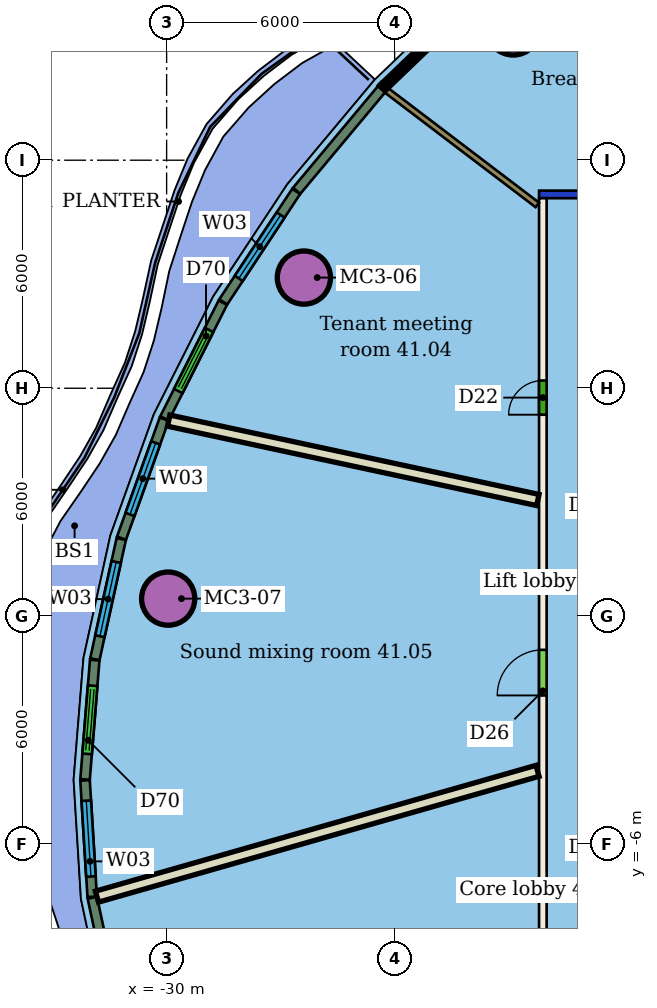
"""IFC4 building model, lengths in metres.
Left out: names, types, materials, properties, quantities, classifications, styles, units other than length and angle.
Written with IfcOpenShell. Run it as: python <this file> out.ifc"""

import sys

from ifc_helpers import new_model, si_unit, direction, frame, frame_2d, origin, origin_2d, place, context, subcontext, project, spatial, rectangle, hollow_circle, extrude, element, fill, save


model = new_model("IFC4")
c1 = context("Model", 3, precision=1e-05, world=origin(), true_north=direction((0.0, 1.0)))
c2 = subcontext(c1, "Body", "Model", "MODEL_VIEW")
j1 = project(units=[si_unit("LENGTHUNIT", "METRE"), si_unit("PLANEANGLEUNIT", "RADIAN")], contexts=[c1])
p1 = place(None, origin())
s1 = spatial("IfcSite", under=j1, at=p1, CompositionType="ELEMENT")
p2 = place(p1, origin())
s2 = spatial("IfcBuilding", under=s1, at=p2, CompositionType="ELEMENT")
p3 = place(p2, frame((0.0, 0.0, 172.2)))
s3 = spatial("IfcBuildingStorey", under=s2, at=p3, CompositionType="ELEMENT", Elevation=172.2)
for number, where, z_axis, x_axis in (
    (1, (-20.879, 15.467, 0.0), (0.0, 0.0, 1.0), (1.0, 0.0, 0.0)),
    (2, (-26.388, 8.912, 0.0), (0.0, 0.0, 1.0), (1.0, 0.0, 0.0)),
    (3, (-29.959, 0.464, 0.0), (0.0, 0.0, 1.0), (1.0, 0.0, 0.0)),
):
    element("IfcColumn", number, at=place(p3, frame(where, z_axis=z_axis, x_axis=x_axis)), inside=s3, PredefinedType="COLUMN", context=c2, shape_type="SweptSolid", body=[
        extrude(hollow_circle(Radius=0.7, WallThickness=0.05, at=origin_2d()), origin(), (0.0, 0.0, 1.0), 3.45),
    ])
p4 = place(p3, frame((-20.1, -11.0, 0.0), z_axis=(0.0, 0.0, 1.0), x_axis=(0.0, 1.0, 0.0)))
e4 = element("IfcWall", 4, at=p4, inside=s3, PredefinedType="PARTITIONING", context=c2, shape_type="SweptSolid", body=[
    extrude(rectangle(XDim=22.0, YDim=0.2, at=frame_2d((11.0, 0.0))), origin(), (0.0, 0.0, 1.0), 3.45),
])
p5 = place(p4, frame((16.303, 0.0, 0.0)))
e5 = element("IfcOpeningElement", 5, at=p5, cuts=e4, PredefinedType="OPENING", context=c2, shape_type="SweptSolid", body=[
    extrude(rectangle(XDim=0.9, YDim=2.1, at=frame_2d((0.45, 1.05))), frame((0.0, 0.11, 0.0), z_axis=(0.0, -1.0, 0.0), x_axis=(1.0, 0.0, 0.0)), (0.0, 0.0, 1.0), 0.22),
])
p6 = place(p4, frame((8.917, 0.0, 0.0)))
e6 = element("IfcOpeningElement", 6, at=p6, cuts=e4, PredefinedType="OPENING", context=c2, shape_type="SweptSolid", body=[
    extrude(rectangle(XDim=1.2, YDim=2.1, at=frame_2d((0.6, 1.05))), frame((0.0, 0.11, 0.0), z_axis=(0.0, -1.0, 0.0), x_axis=(1.0, 0.0, 0.0)), (0.0, 0.0, 1.0), 0.22),
])
p7 = place(p3, frame((-20.2, 11.1, 0.0), z_axis=(0.0, 0.0, 1.0), x_axis=(1.0, 0.0, 0.0)))
e7 = element("IfcWall", 7, at=p7, inside=s3, PredefinedType="PARTITIONING", context=c2, shape_type="SweptSolid", body=[
    extrude(rectangle(XDim=28.4, YDim=0.2, at=frame_2d((14.2, 0.0))), origin(), (0.0, 0.0, 1.0), 3.05),
])
p8 = place(p7, frame((20.272, 0.0, 0.0)))
e8 = element("IfcOpeningElement", 8, at=p8, cuts=e7, PredefinedType="OPENING", context=c2, shape_type="SweptSolid", body=[
    extrude(rectangle(XDim=1.1, YDim=2.1, at=frame_2d((0.55, 1.05))), frame((0.0, 0.11, 0.0), z_axis=(0.0, -1.0, 0.0), x_axis=(1.0, 0.0, 0.0)), (0.0, 0.0, 1.0), 0.22),
])
p9 = place(p7, frame((11.124, 0.0, 0.0)))
e9 = element("IfcOpeningElement", 9, at=p9, cuts=e7, PredefinedType="OPENING", context=c2, shape_type="SweptSolid", body=[
    extrude(rectangle(XDim=1.8, YDim=2.1, at=frame_2d((0.9, 1.05))), frame((0.0, 0.11, 0.0), z_axis=(0.0, -1.0, 0.0), x_axis=(1.0, 0.0, 0.0)), (0.0, 0.0, 1.0), 0.22),
])
p10 = place(p7, frame((5.001, 0.0, 0.0)))
e10 = element("IfcOpeningElement", 10, at=p10, cuts=e7, PredefinedType="OPENING", context=c2, shape_type="SweptSolid", body=[
    extrude(rectangle(XDim=1.5, YDim=2.1, at=frame_2d((0.75, 1.05))), frame((0.0, 0.11, 0.0), z_axis=(0.0, -1.0, 0.0), x_axis=(1.0, 0.0, 0.0)), (0.0, 0.0, 1.0), 0.22),
])
p11 = place(p3, frame((-24.209, 13.835, 0.0), z_axis=(0.0, 0.0, 1.0), x_axis=(0.796229293109, -0.604994969231, 0.0)))
e11 = element("IfcWall", 11, at=p11, inside=s3, PredefinedType="PARTITIONING", context=c2, shape_type="SweptSolid", body=[
    extrude(rectangle(XDim=4.978, YDim=0.15, at=frame_2d((2.489, 0.0))), origin(), (0.0, 0.0, 1.0), 3.45),
])
p12 = place(p3, frame((-29.946, 5.147, 0.0), z_axis=(0.0, 0.0, 1.0), x_axis=(0.977667369108, -0.210158310286, 0.0)))
e12 = element("IfcWall", 12, at=p12, inside=s3, PredefinedType="PARTITIONING", context=c2, shape_type="SweptSolid", body=[
    extrude(rectangle(XDim=9.936, YDim=0.3, at=frame_2d((4.968, 0.0))), origin(), (0.0, 0.0, 1.0), 3.45),
])
p13 = place(p3, frame((-31.834, -7.378, 0.0), z_axis=(0.0, 0.0, 1.0), x_axis=(0.961553744582, 0.274616817183, 0.0)))
e13 = element("IfcWall", 13, at=p13, inside=s3, PredefinedType="PARTITIONING", context=c2, shape_type="SweptSolid", body=[
    extrude(rectangle(XDim=12.056, YDim=0.3, at=frame_2d((6.028, 0.0))), origin(), (0.0, 0.0, 1.0), 3.45),
])
p14 = place(p3, frame((-24.335, 13.878, 0.0), z_axis=(0.0, 0.0, 1.0), x_axis=(-0.64142670303, -0.767184322468, 0.0)))
e14 = element("IfcWall", 14, at=p14, inside=s3, PredefinedType="SOLIDWALL", context=c2, shape_type="SweptSolid", body=[
    extrude(rectangle(XDim=3.496, YDim=0.25, at=frame_2d((1.748, 0.0))), origin(), (0.0, 0.0, 1.0), 3.1),
])
p15 = place(p3, frame((-26.591, 11.177, 0.0), z_axis=(0.0, 0.0, 1.0), x_axis=(-0.551021923649, -0.834490766671, 0.0)))
e15 = element("IfcWall", 15, at=p15, inside=s3, PredefinedType="SOLIDWALL", context=c2, shape_type="SweptSolid", body=[
    extrude(rectangle(XDim=3.482, YDim=0.25, at=frame_2d((1.741, 0.0))), origin(), (0.0, 0.0, 1.0), 3.1),
])
p16 = place(p15, frame((0.741, 0.0, 0.9)))
e16 = element("IfcOpeningElement", 16, at=p16, cuts=e15, PredefinedType="OPENING", context=c2, shape_type="SweptSolid", body=[
    extrude(rectangle(XDim=2.0, YDim=2.1, at=frame_2d((1.0, 1.05))), frame((0.0, 0.135, 0.0), z_axis=(0.0, -1.0, 0.0), x_axis=(1.0, 0.0, 0.0)), (0.0, 0.0, 1.0), 0.27),
])
p17 = place(p3, frame((-28.521, 8.252, 0.0), z_axis=(0.0, 0.0, 1.0), x_axis=(-0.449903975736, -0.893076935441, 0.0)))
e17 = element("IfcWall", 17, at=p17, inside=s3, PredefinedType="SOLIDWALL", context=c2, shape_type="SweptSolid", body=[
    extrude(rectangle(XDim=3.409, YDim=0.25, at=frame_2d((1.705, 0.0))), origin(), (0.0, 0.0, 1.0), 3.1),
])
p18 = place(p17, frame((0.805, 0.0, 0.0)))
e18 = element("IfcOpeningElement", 18, at=p18, cuts=e17, PredefinedType="OPENING", context=c2, shape_type="SweptSolid", body=[
    extrude(rectangle(XDim=1.8, YDim=2.4, at=frame_2d((0.9, 1.2))), frame((0.0, 0.135, 0.0), z_axis=(0.0, -1.0, 0.0), x_axis=(1.0, 0.0, 0.0)), (0.0, 0.0, 1.0), 0.27),
])
p19 = place(p3, frame((-30.064, 5.186, 0.0), z_axis=(0.0, 0.0, 1.0), x_axis=(-0.337661333214, -0.941267668653, 0.0)))
e19 = element("IfcWall", 19, at=p19, inside=s3, PredefinedType="SOLIDWALL", context=c2, shape_type="SweptSolid", body=[
    extrude(rectangle(XDim=3.326, YDim=0.25, at=frame_2d((1.663, 0.0))), origin(), (0.0, 0.0, 1.0), 3.1),
])
p20 = place(p19, frame((0.663, 0.0, 0.9)))
e20 = element("IfcOpeningElement", 20, at=p20, cuts=e19, PredefinedType="OPENING", context=c2, shape_type="SweptSolid", body=[
    extrude(rectangle(XDim=2.0, YDim=2.1, at=frame_2d((1.0, 1.05))), frame((0.0, 0.135, 0.0), z_axis=(0.0, -1.0, 0.0), x_axis=(1.0, 0.0, 0.0)), (0.0, 0.0, 1.0), 0.27),
])
p21 = place(p3, frame((-31.194, 2.032, 0.0), z_axis=(0.0, 0.0, 1.0), x_axis=(-0.21439852093, -0.976746269111, 0.0)))
e21 = element("IfcWall", 21, at=p21, inside=s3, PredefinedType="SOLIDWALL", context=c2, shape_type="SweptSolid", body=[
    extrude(rectangle(XDim=3.237, YDim=0.25, at=frame_2d((1.619, 0.0))), origin(), (0.0, 0.0, 1.0), 3.1),
])
p22 = place(p21, frame((0.619, 0.0, 0.9)))
e22 = element("IfcOpeningElement", 22, at=p22, cuts=e21, PredefinedType="OPENING", context=c2, shape_type="SweptSolid", body=[
    extrude(rectangle(XDim=2.0, YDim=2.1, at=frame_2d((1.0, 1.05))), frame((0.0, 0.135, 0.0), z_axis=(0.0, -1.0, 0.0), x_axis=(1.0, 0.0, 0.0)), (0.0, 0.0, 1.0), 0.27),
])
p23 = place(p3, frame((-31.892, -1.154, 0.0), z_axis=(0.0, 0.0, 1.0), x_axis=(-0.080857499855, -0.996725671746, 0.0)))
e23 = element("IfcWall", 23, at=p23, inside=s3, PredefinedType="SOLIDWALL", context=c2, shape_type="SweptSolid", body=[
    extrude(rectangle(XDim=3.149, YDim=0.25, at=frame_2d((1.575, 0.0))), origin(), (0.0, 0.0, 1.0), 3.1),
])
p24 = place(p23, frame((0.675, 0.0, 0.0)))
e24 = element("IfcOpeningElement", 24, at=p24, cuts=e23, PredefinedType="OPENING", context=c2, shape_type="SweptSolid", body=[
    extrude(rectangle(XDim=1.8, YDim=2.4, at=frame_2d((0.9, 1.2))), frame((0.0, 0.135, 0.0), z_axis=(0.0, -1.0, 0.0), x_axis=(1.0, 0.0, 0.0)), (0.0, 0.0, 1.0), 0.27),
])
p25 = place(p3, frame((-32.147, -4.319, 0.0), z_axis=(0.0, 0.0, 1.0), x_axis=(0.061432025832, -0.99811126945, 0.0)))
e25 = element("IfcWall", 25, at=p25, inside=s3, PredefinedType="SOLIDWALL", context=c2, shape_type="SweptSolid", body=[
    extrude(rectangle(XDim=3.068, YDim=0.25, at=frame_2d((1.534, 0.0))), origin(), (0.0, 0.0, 1.0), 3.1),
])
p26 = place(p25, frame((0.534, 0.0, 0.9)))
e26 = element("IfcOpeningElement", 26, at=p26, cuts=e25, PredefinedType="OPENING", context=c2, shape_type="SweptSolid", body=[
    extrude(rectangle(XDim=2.0, YDim=2.1, at=frame_2d((1.0, 1.05))), frame((0.0, 0.135, 0.0), z_axis=(0.0, -1.0, 0.0), x_axis=(1.0, 0.0, 0.0)), (0.0, 0.0, 1.0), 0.27),
])
p27 = place(p3, frame((-31.955, -7.408, 0.0), z_axis=(0.0, 0.0, 1.0), x_axis=(0.208841558972, -0.977949489108, 0.0)))
e27 = element("IfcWall", 27, at=p27, inside=s3, PredefinedType="SOLIDWALL", context=c2, shape_type="SweptSolid", body=[
    extrude(rectangle(XDim=2.959, YDim=0.25, at=frame_2d((1.479, 0.0))), origin(), (0.0, 0.0, 1.0), 3.1),
])
p28 = place(p5, origin())
e28 = element("IfcDoor", 28, at=p28, inside=s3, OperationType="SINGLE_SWING_LEFT", PredefinedType="DOOR", context=c2, shape_type="SweptSolid", body=[
    extrude(rectangle(XDim=0.9, YDim=2.1, at=frame_2d((0.45, 1.05))), frame((0.0, 0.025, 0.0), z_axis=(0.0, -1.0, 0.0), x_axis=(1.0, 0.0, 0.0)), (0.0, 0.0, 1.0), 0.05),
])
fill(e5, e28)
p29 = place(p6, origin())
e29 = element("IfcDoor", 29, at=p29, inside=s3, OperationType="SINGLE_SWING_LEFT", PredefinedType="DOOR", context=c2, shape_type="SweptSolid", body=[
    extrude(rectangle(XDim=1.2, YDim=2.1, at=frame_2d((0.6, 1.05))), frame((0.0, 0.025, 0.0), z_axis=(0.0, -1.0, 0.0), x_axis=(1.0, 0.0, 0.0)), (0.0, 0.0, 1.0), 0.05),
])
fill(e6, e29)
p30 = place(p16, origin())
e30 = element("IfcWindow", 30, at=p30, inside=s3, PartitioningType="SINGLE_PANEL", PredefinedType="WINDOW", context=c2, shape_type="SweptSolid", body=[
    extrude(rectangle(XDim=2.0, YDim=2.1, at=frame_2d((1.0, 1.05))), frame((0.0, 0.03, 0.0), z_axis=(0.0, -1.0, 0.0), x_axis=(1.0, 0.0, 0.0)), (0.0, 0.0, 1.0), 0.06),
])
fill(e16, e30)
p31 = place(p18, origin())
e31 = element("IfcDoor", 31, at=p31, inside=s3, OperationType="DOUBLE_DOOR_SLIDING", PredefinedType="DOOR", context=c2, shape_type="SweptSolid", body=[
    extrude(rectangle(XDim=1.8, YDim=2.4, at=frame_2d((0.9, 1.2))), frame((0.0, 0.025, 0.0), z_axis=(0.0, -1.0, 0.0), x_axis=(1.0, 0.0, 0.0)), (0.0, 0.0, 1.0), 0.05),
])
fill(e18, e31)
p32 = place(p20, origin())
e32 = element("IfcWindow", 32, at=p32, inside=s3, PartitioningType="SINGLE_PANEL", PredefinedType="WINDOW", context=c2, shape_type="SweptSolid", body=[
    extrude(rectangle(XDim=2.0, YDim=2.1, at=frame_2d((1.0, 1.05))), frame((0.0, 0.03, 0.0), z_axis=(0.0, -1.0, 0.0), x_axis=(1.0, 0.0, 0.0)), (0.0, 0.0, 1.0), 0.06),
])
fill(e20, e32)
p33 = place(p22, origin())
e33 = element("IfcWindow", 33, at=p33, inside=s3, PartitioningType="SINGLE_PANEL", PredefinedType="WINDOW", context=c2, shape_type="SweptSolid", body=[
    extrude(rectangle(XDim=2.0, YDim=2.1, at=frame_2d((1.0, 1.05))), frame((0.0, 0.03, 0.0), z_axis=(0.0, -1.0, 0.0), x_axis=(1.0, 0.0, 0.0)), (0.0, 0.0, 1.0), 0.06),
])
fill(e22, e33)
p34 = place(p24, origin())
e34 = element("IfcDoor", 34, at=p34, inside=s3, OperationType="DOUBLE_DOOR_SLIDING", PredefinedType="DOOR", context=c2, shape_type="SweptSolid", body=[
    extrude(rectangle(XDim=1.8, YDim=2.4, at=frame_2d((0.9, 1.2))), frame((0.0, 0.025, 0.0), z_axis=(0.0, -1.0, 0.0), x_axis=(1.0, 0.0, 0.0)), (0.0, 0.0, 1.0), 0.05),
])
fill(e24, e34)
p35 = place(p26, origin())
e35 = element("IfcWindow", 35, at=p35, inside=s3, PartitioningType="SINGLE_PANEL", PredefinedType="WINDOW", context=c2, shape_type="SweptSolid", body=[
    extrude(rectangle(XDim=2.0, YDim=2.1, at=frame_2d((1.0, 1.05))), frame((0.0, 0.03, 0.0), z_axis=(0.0, -1.0, 0.0), x_axis=(1.0, 0.0, 0.0)), (0.0, 0.0, 1.0), 0.06),
])
fill(e26, e35)
save(model, sys.argv[1])
